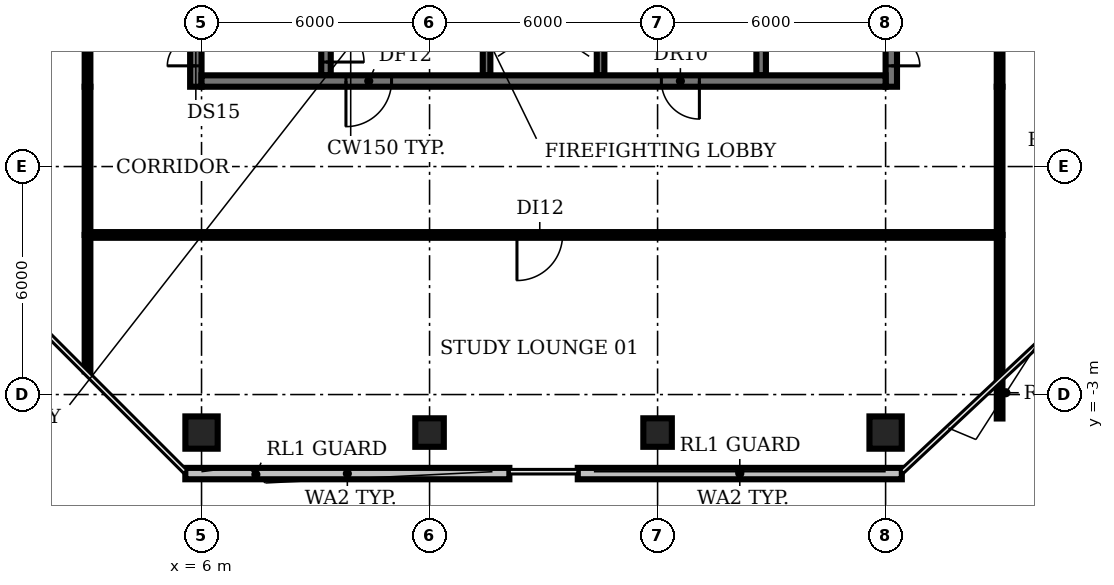
"""IFC4 building model, lengths in metres.
Left out: names, types, materials, properties, quantities, classifications, styles, units other than length and angle.
Written with IfcOpenShell. Run it as: python <this file> out.ifc"""

import sys

from ifc_helpers import new_model, si_unit, direction, frame, frame_2d, origin, origin_2d, place, context, subcontext, project, spatial, rectangle, circle, extrude, element, fill, save


model = new_model("IFC4")
c1 = context("Model", 3, precision=1e-05, world=origin(), true_north=direction((0.0, 1.0)))
c2 = subcontext(c1, "Body", "Model", "MODEL_VIEW")
j1 = project(units=[si_unit("LENGTHUNIT", "METRE"), si_unit("PLANEANGLEUNIT", "RADIAN")], contexts=[c1])
p1 = place(None, origin())
s1 = spatial("IfcSite", under=j1, at=p1, CompositionType="ELEMENT")
p2 = place(p1, origin())
s2 = spatial("IfcBuilding", under=s1, at=p2, CompositionType="ELEMENT")
p3 = place(p2, frame((0.0, 0.0, 302.0)))
s3 = spatial("IfcBuildingStorey", under=s2, at=p3, CompositionType="ELEMENT", Elevation=302.0)
p4 = place(p3, frame((6.0, -4.0, 0.0), z_axis=(0.0, 0.0, 1.0), x_axis=(1.0, 0.0, 0.0)))
e1 = element("IfcColumn", 1, at=p4, inside=s3, PredefinedType="COLUMN", context=c2, shape_type="SweptSolid", body=[
    extrude(circle(Radius=0.425, at=origin_2d()), origin(), (0.0, 0.0, 1.0), 3.85),
])
for number, where, z_axis, x_axis in (
    (2, (12.0, -4.0, 0.0), (0.0, 0.0, 1.0), (1.0, 0.0, 0.0)),
    (3, (18.0, -4.0, 0.0), (0.0, 0.0, 1.0), (1.0, 0.0, 0.0)),
):
    element("IfcColumn", number, at=place(p3, frame(where, z_axis=z_axis, x_axis=x_axis)), inside=s3, PredefinedType="COLUMN", context=c2, shape_type="SweptSolid", body=[
        extrude(rectangle(XDim=0.75, YDim=0.75, at=origin_2d()), origin(), (0.0, 0.0, 1.0), 3.85),
    ])
p5 = place(p3, frame((24.0, -4.0, 0.0), z_axis=(0.0, 0.0, 1.0), x_axis=(1.0, 0.0, 0.0)))
e4 = element("IfcColumn", 4, at=p5, inside=s3, PredefinedType="COLUMN", context=c2, shape_type="SweptSolid", body=[
    extrude(circle(Radius=0.425, at=origin_2d()), origin(), (0.0, 0.0, 1.0), 3.85),
])
for number, where, z_axis, x_axis in (
    (5, (5.573, -5.08, 0.0), (0.0, 0.0, 1.0), (1.0, 0.0, 0.0)),
    (6, (15.9, -5.08, 0.0), (0.0, 0.0, 1.0), (1.0, 0.0, 0.0)),
):
    element("IfcWall", number, at=place(p3, frame(where, z_axis=z_axis, x_axis=x_axis)), inside=s3, PredefinedType="SOLIDWALL", context=c2, shape_type="SweptSolid", body=[
        extrude(rectangle(XDim=8.527, YDim=0.3, at=frame_2d((4.263, 0.0))), origin(), (0.0, 0.0, 1.0), 3.85),
    ])
p6 = place(p3, frame((9.275, 11.825, 0.0), z_axis=(0.0, 0.0, 1.0), x_axis=(0.0, -1.0, 0.0)))
e7 = element("IfcWall", 7, at=p6, inside=s3, PredefinedType="SHEAR", context=c2, shape_type="SweptSolid", body=[
    extrude(rectangle(XDim=6.425, YDim=0.25, at=frame_2d((3.212, 0.0))), origin(), (0.0, 0.0, 1.0), 3.85),
])
p7 = place(p6, frame((5.075, 0.0, 0.0)))
e8 = element("IfcOpeningElement", 8, at=p7, cuts=e7, PredefinedType="OPENING", context=c2, shape_type="SweptSolid", body=[
    extrude(rectangle(XDim=1.0, YDim=2.1, at=frame_2d((0.5, 1.05))), frame((0.0, 0.135, 0.0), z_axis=(0.0, -1.0, 0.0), x_axis=(1.0, 0.0, 0.0)), (0.0, 0.0, 1.0), 0.27),
])
p8 = place(p3, frame((13.5, 5.4, 0.0), z_axis=(0.0, 0.0, 1.0), x_axis=(0.0, 1.0, 0.0)))
e9 = element("IfcWall", 9, at=p8, inside=s3, PredefinedType="SHEAR", context=c2, shape_type="SweptSolid", body=[
    extrude(rectangle(XDim=8.2, YDim=0.2, at=frame_2d((4.1, 0.0))), origin(), (0.0, 0.0, 1.0), 3.85),
])
p9 = place(p8, frame((0.75, 0.0, 0.0)))
e10 = element("IfcOpeningElement", 10, at=p9, cuts=e9, PredefinedType="OPENING", context=c2, shape_type="SweptSolid", body=[
    extrude(rectangle(XDim=1.1, YDim=2.1, at=frame_2d((0.55, 1.05))), frame((0.0, 0.11, 0.0), z_axis=(0.0, -1.0, 0.0), x_axis=(1.0, 0.0, 0.0)), (0.0, 0.0, 1.0), 0.22),
])
p10 = place(p8, frame((3.55, 0.0, 0.0)))
e11 = element("IfcOpeningElement", 11, at=p10, cuts=e9, PredefinedType="OPENING", context=c2, shape_type="SweptSolid", body=[
    extrude(rectangle(XDim=1.1, YDim=2.1, at=frame_2d((0.55, 1.05))), frame((0.0, 0.11, 0.0), z_axis=(0.0, -1.0, 0.0), x_axis=(1.0, 0.0, 0.0)), (0.0, 0.0, 1.0), 0.22),
])
p11 = place(p8, frame((6.35, 0.0, 0.0)))
e12 = element("IfcOpeningElement", 12, at=p11, cuts=e9, PredefinedType="OPENING", context=c2, shape_type="SweptSolid", body=[
    extrude(rectangle(XDim=1.1, YDim=2.1, at=frame_2d((0.55, 1.05))), frame((0.0, 0.11, 0.0), z_axis=(0.0, -1.0, 0.0), x_axis=(1.0, 0.0, 0.0)), (0.0, 0.0, 1.0), 0.22),
])
p12 = place(p3, frame((16.5, 5.4, 0.0), z_axis=(0.0, 0.0, 1.0), x_axis=(0.0, 1.0, 0.0)))
e13 = element("IfcWall", 13, at=p12, inside=s3, PredefinedType="SHEAR", context=c2, shape_type="SweptSolid", body=[
    extrude(rectangle(XDim=8.2, YDim=0.2, at=frame_2d((4.1, 0.0))), origin(), (0.0, 0.0, 1.0), 3.85),
])
p13 = place(p3, frame((20.725, 5.4, 0.0), z_axis=(0.0, 0.0, 1.0), x_axis=(0.0, 1.0, 0.0)))
e14 = element("IfcWall", 14, at=p13, inside=s3, PredefinedType="SHEAR", context=c2, shape_type="SweptSolid", body=[
    extrude(rectangle(XDim=8.2, YDim=0.25, at=frame_2d((4.1, 0.0))), origin(), (0.0, 0.0, 1.0), 3.85),
])
p14 = place(p3, frame((5.85, 5.1, 0.0), z_axis=(0.0, 0.0, 1.0), x_axis=(0.0, 1.0, 0.0)))
e15 = element("IfcWall", 15, at=p14, inside=s3, PredefinedType="SHEAR", context=c2, shape_type="SweptSolid", body=[
    extrude(rectangle(XDim=20.0, YDim=0.3, at=frame_2d((10.0, 0.0))), origin(), (0.0, 0.0, 1.0), 3.85),
])
p15 = place(p14, frame((0.55, 0.0, 0.0)))
e16 = element("IfcOpeningElement", 16, at=p15, cuts=e15, PredefinedType="OPENING", context=c2, shape_type="SweptSolid", body=[
    extrude(rectangle(XDim=1.5, YDim=2.1, at=frame_2d((0.75, 1.05))), frame((0.0, 0.16, 0.0), z_axis=(0.0, -1.0, 0.0), x_axis=(1.0, 0.0, 0.0)), (0.0, 0.0, 1.0), 0.32),
])
p16 = place(p14, frame((7.0, 0.0, 0.0)))
e17 = element("IfcOpeningElement", 17, at=p16, cuts=e15, PredefinedType="OPENING", context=c2, shape_type="SweptSolid", body=[
    extrude(rectangle(XDim=1.2, YDim=2.1, at=frame_2d((0.6, 1.05))), frame((0.0, 0.16, 0.0), z_axis=(0.0, -1.0, 0.0), x_axis=(1.0, 0.0, 0.0)), (0.0, 0.0, 1.0), 0.32),
])
p17 = place(p14, frame((13.55, 0.0, 0.0)))
e18 = element("IfcOpeningElement", 18, at=p17, cuts=e15, PredefinedType="OPENING", context=c2, shape_type="SweptSolid", body=[
    extrude(rectangle(XDim=1.2, YDim=2.1, at=frame_2d((0.6, 1.05))), frame((0.0, 0.16, 0.0), z_axis=(0.0, -1.0, 0.0), x_axis=(1.0, 0.0, 0.0)), (0.0, 0.0, 1.0), 0.32),
])
p18 = place(p3, frame((24.15, 25.655, 0.0), z_axis=(0.0, 0.0, 1.0), x_axis=(0.0, -1.0, 0.0)))
e19 = element("IfcWall", 19, at=p18, inside=s3, PredefinedType="SHEAR", context=c2, shape_type="SweptSolid", body=[
    extrude(rectangle(XDim=20.555, YDim=0.3, at=frame_2d((10.277, 0.0))), origin(), (0.0, 0.0, 1.0), 3.85),
])
p19 = place(p18, frame((18.505, 0.0, 0.0)))
e20 = element("IfcOpeningElement", 20, at=p19, cuts=e19, PredefinedType="OPENING", context=c2, shape_type="SweptSolid", body=[
    extrude(rectangle(XDim=1.5, YDim=2.1, at=frame_2d((0.75, 1.05))), frame((0.0, 0.16, 0.0), z_axis=(0.0, -1.0, 0.0), x_axis=(1.0, 0.0, 0.0)), (0.0, 0.0, 1.0), 0.32),
])
p20 = place(p18, frame((12.405, 0.0, 0.0)))
e21 = element("IfcOpeningElement", 21, at=p20, cuts=e19, PredefinedType="OPENING", context=c2, shape_type="SweptSolid", body=[
    extrude(rectangle(XDim=0.9, YDim=2.1, at=frame_2d((0.45, 1.05))), frame((0.0, 0.16, 0.0), z_axis=(0.0, -1.0, 0.0), x_axis=(1.0, 0.0, 0.0)), (0.0, 0.0, 1.0), 0.32),
])
p21 = place(p18, frame((6.405, 0.0, 0.0)))
e22 = element("IfcOpeningElement", 22, at=p21, cuts=e19, PredefinedType="OPENING", context=c2, shape_type="SweptSolid", body=[
    extrude(rectangle(XDim=2.0, YDim=2.1, at=frame_2d((1.0, 1.05))), frame((0.0, 0.16, 0.0), z_axis=(0.0, -1.0, 0.0), x_axis=(1.0, 0.0, 0.0)), (0.0, 0.0, 1.0), 0.32),
])
p22 = place(p3, frame((24.0, 5.25, 0.0), z_axis=(0.0, 0.0, 1.0), x_axis=(-1.0, 0.0, 0.0)))
e23 = element("IfcWall", 23, at=p22, inside=s3, PredefinedType="SHEAR", context=c2, shape_type="SweptSolid", body=[
    extrude(rectangle(XDim=18.0, YDim=0.3, at=frame_2d((9.0, 0.0))), origin(), (0.0, 0.0, 1.0), 3.85),
])
p23 = place(p22, frame((13.0, 0.0, 0.0)))
e24 = element("IfcOpeningElement", 24, at=p23, cuts=e23, PredefinedType="OPENING", context=c2, shape_type="SweptSolid", body=[
    extrude(rectangle(XDim=1.2, YDim=2.1, at=frame_2d((0.6, 1.05))), frame((0.0, 0.16, 0.0), z_axis=(0.0, -1.0, 0.0), x_axis=(1.0, 0.0, 0.0)), (0.0, 0.0, 1.0), 0.32),
])
p24 = place(p22, frame((4.9, 0.0, 0.0)))
e25 = element("IfcOpeningElement", 25, at=p24, cuts=e23, PredefinedType="OPENING", context=c2, shape_type="SweptSolid", body=[
    extrude(rectangle(XDim=1.0, YDim=2.1, at=frame_2d((0.5, 1.05))), frame((0.0, 0.16, 0.0), z_axis=(0.0, -1.0, 0.0), x_axis=(1.0, 0.0, 0.0)), (0.0, 0.0, 1.0), 0.32),
])
p25 = place(p3, frame((3.0, -2.39, 0.0), z_axis=(0.0, 0.0, 1.0), x_axis=(0.0, 1.0, 0.0)))
e26 = element("IfcWall", 26, at=p25, inside=s3, PredefinedType="PARTITIONING", context=c2, shape_type="SweptSolid", body=[
    extrude(rectangle(XDim=3.59, YDim=0.15, at=frame_2d((1.795, 0.0))), origin(), (0.0, 0.0, 1.0), 2.9),
])
p26 = place(p3, frame((3.0, 1.2, 0.0), z_axis=(0.0, 0.0, 1.0), x_axis=(0.0, 1.0, 0.0)))
e27 = element("IfcWall", 27, at=p26, inside=s3, PredefinedType="PARTITIONING", context=c2, shape_type="SweptSolid", body=[
    extrude(rectangle(XDim=3.9, YDim=0.15, at=frame_2d((1.95, 0.0))), origin(), (0.0, 0.0, 1.0), 2.9),
])
p27 = place(p3, frame((3.0, 5.1, 0.0), z_axis=(0.0, 0.0, 1.0), x_axis=(0.0, 1.0, 0.0)))
e28 = element("IfcWall", 28, at=p27, inside=s3, PredefinedType="PARTITIONING", context=c2, shape_type="SweptSolid", body=[
    extrude(rectangle(XDim=20.0, YDim=0.15, at=frame_2d((10.0, 0.0))), origin(), (0.0, 0.0, 1.0), 2.9),
])
p28 = place(p27, frame((9.3, 0.0, 0.0)))
e29 = element("IfcOpeningElement", 29, at=p28, cuts=e28, PredefinedType="OPENING", context=c2, shape_type="SweptSolid", body=[
    extrude(rectangle(XDim=1.2, YDim=2.1, at=frame_2d((0.6, 1.05))), frame((0.0, 0.085, 0.0), z_axis=(0.0, -1.0, 0.0), x_axis=(1.0, 0.0, 0.0)), (0.0, 0.0, 1.0), 0.17),
])
p29 = place(p3, frame((27.0, -3.63, 0.0), z_axis=(0.0, 0.0, 1.0), x_axis=(0.0, 1.0, 0.0)))
e30 = element("IfcWall", 30, at=p29, inside=s3, PredefinedType="PARTITIONING", context=c2, shape_type="SweptSolid", body=[
    extrude(rectangle(XDim=4.83, YDim=0.15, at=frame_2d((2.415, 0.0))), origin(), (0.0, 0.0, 1.0), 2.9),
])
p30 = place(p3, frame((27.0, 1.2, 0.0), z_axis=(0.0, 0.0, 1.0), x_axis=(-1.0, 0.0, 0.0)))
e31 = element("IfcWall", 31, at=p30, inside=s3, PredefinedType="PARTITIONING", context=c2, shape_type="SweptSolid", body=[
    extrude(rectangle(XDim=24.0, YDim=0.15, at=frame_2d((12.0, 0.0))), origin(), (0.0, 0.0, 1.0), 2.9),
])
p31 = place(p30, frame((11.5, 0.0, 0.0)))
e32 = element("IfcOpeningElement", 32, at=p31, cuts=e31, PredefinedType="OPENING", context=c2, shape_type="SweptSolid", body=[
    extrude(rectangle(XDim=1.2, YDim=2.1, at=frame_2d((0.6, 1.05))), frame((0.0, 0.085, 0.0), z_axis=(0.0, -1.0, 0.0), x_axis=(1.0, 0.0, 0.0)), (0.0, 0.0, 1.0), 0.17),
])
p32 = place(p3, frame((27.0, 1.2, 0.0), z_axis=(0.0, 0.0, 1.0), x_axis=(0.0, 1.0, 0.0)))
e33 = element("IfcWall", 33, at=p32, inside=s3, PredefinedType="PARTITIONING", context=c2, shape_type="SweptSolid", body=[
    extrude(rectangle(XDim=3.9, YDim=0.15, at=frame_2d((1.95, 0.0))), origin(), (0.0, 0.0, 1.0), 2.9),
])
p33 = place(p3, frame((27.0, 14.85, 0.0), z_axis=(0.0, 0.0, 1.0), x_axis=(0.0, -1.0, 0.0)))
e34 = element("IfcWall", 34, at=p33, inside=s3, PredefinedType="PARTITIONING", context=c2, shape_type="SweptSolid", body=[
    extrude(rectangle(XDim=9.75, YDim=0.15, at=frame_2d((4.875, 0.0))), origin(), (0.0, 0.0, 1.0), 2.9),
])
p34 = place(p33, frame((4.15, 0.0, 0.0)))
e35 = element("IfcOpeningElement", 35, at=p34, cuts=e34, PredefinedType="OPENING", context=c2, shape_type="SweptSolid", body=[
    extrude(rectangle(XDim=1.2, YDim=2.1, at=frame_2d((0.6, 1.05))), frame((0.0, 0.085, 0.0), z_axis=(0.0, -1.0, 0.0), x_axis=(1.0, 0.0, 0.0)), (0.0, 0.0, 1.0), 0.17),
])
p35 = place(p7, origin())
e36 = element("IfcDoor", 36, at=p35, inside=s3, OperationType="SINGLE_SWING_RIGHT", PredefinedType="DOOR", context=c2, shape_type="SweptSolid", body=[
    extrude(rectangle(XDim=1.0, YDim=2.1, at=frame_2d((0.5, 1.05))), frame((0.0, 0.025, 0.0), z_axis=(0.0, -1.0, 0.0), x_axis=(1.0, 0.0, 0.0)), (0.0, 0.0, 1.0), 0.05),
])
fill(e8, e36)
p36 = place(p15, origin())
e37 = element("IfcDoor", 37, at=p36, inside=s3, OperationType="DOUBLE_DOOR_SINGLE_SWING", PredefinedType="DOOR", context=c2, shape_type="SweptSolid", body=[
    extrude(rectangle(XDim=1.5, YDim=2.1, at=frame_2d((0.75, 1.05))), frame((0.0, 0.025, 0.0), z_axis=(0.0, -1.0, 0.0), x_axis=(1.0, 0.0, 0.0)), (0.0, 0.0, 1.0), 0.05),
])
fill(e16, e37)
p37 = place(p19, origin())
e38 = element("IfcDoor", 38, at=p37, inside=s3, OperationType="DOUBLE_DOOR_SINGLE_SWING", PredefinedType="DOOR", context=c2, shape_type="SweptSolid", body=[
    extrude(rectangle(XDim=1.5, YDim=2.1, at=frame_2d((0.75, 1.05))), frame((0.0, 0.025, 0.0), z_axis=(0.0, -1.0, 0.0), x_axis=(1.0, 0.0, 0.0)), (0.0, 0.0, 1.0), 0.05),
])
fill(e20, e38)
p38 = place(p23, origin())
e39 = element("IfcDoor", 39, at=p38, inside=s3, OperationType="SINGLE_SWING_RIGHT", PredefinedType="DOOR", context=c2, shape_type="SweptSolid", body=[
    extrude(rectangle(XDim=1.2, YDim=2.1, at=frame_2d((0.6, 1.05))), frame((0.0, 0.025, 0.0), z_axis=(0.0, -1.0, 0.0), x_axis=(1.0, 0.0, 0.0)), (0.0, 0.0, 1.0), 0.05),
])
fill(e24, e39)
p39 = place(p24, origin())
e40 = element("IfcDoor", 40, at=p39, inside=s3, OperationType="SINGLE_SWING_LEFT", PredefinedType="DOOR", context=c2, shape_type="SweptSolid", body=[
    extrude(rectangle(XDim=1.0, YDim=2.1, at=frame_2d((0.5, 1.05))), frame((0.0, 0.025, 0.0), z_axis=(0.0, -1.0, 0.0), x_axis=(1.0, 0.0, 0.0)), (0.0, 0.0, 1.0), 0.05),
])
fill(e25, e40)
p40 = place(p31, origin())
e41 = element("IfcDoor", 41, at=p40, inside=s3, OperationType="SINGLE_SWING_RIGHT", PredefinedType="DOOR", context=c2, shape_type="SweptSolid", body=[
    extrude(rectangle(XDim=1.2, YDim=2.1, at=frame_2d((0.6, 1.05))), frame((0.0, 0.025, 0.0), z_axis=(0.0, -1.0, 0.0), x_axis=(1.0, 0.0, 0.0)), (0.0, 0.0, 1.0), 0.05),
])
fill(e32, e41)
save(model, sys.argv[1])
